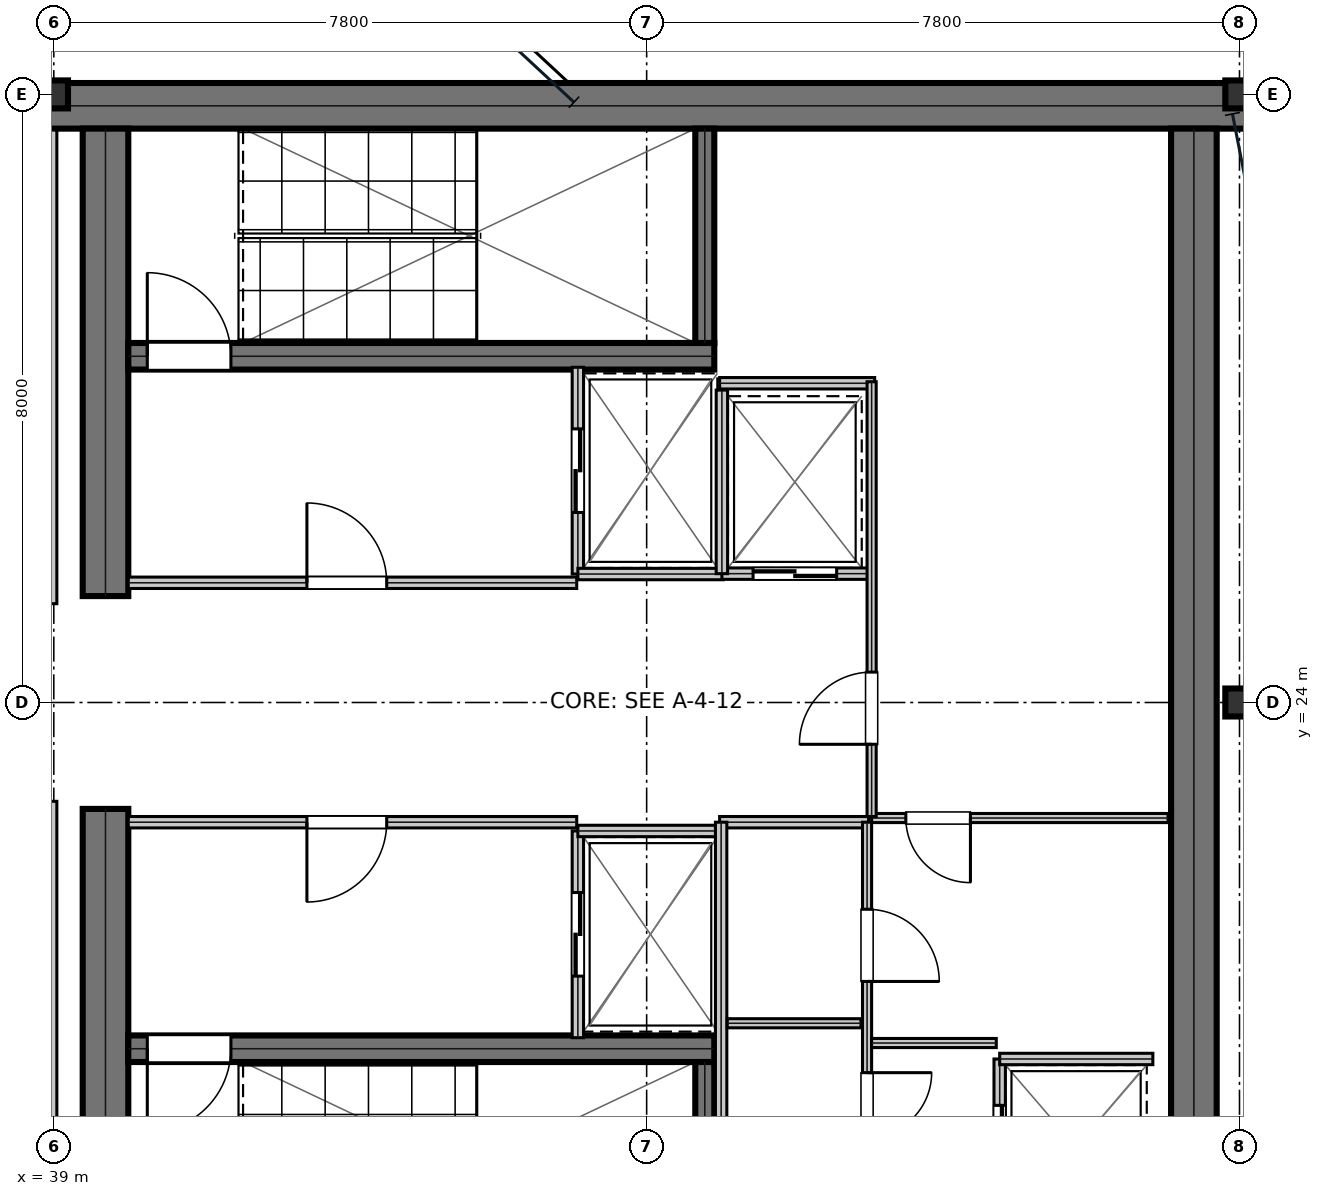
"""IFC4 building model, lengths in metres.
Left out: names, types, materials, properties, quantities, classifications, styles, units other than length and angle.
Written with IfcOpenShell. Run it as: python <this file> out.ifc"""

import sys

from ifc_helpers import new_model, si_unit, direction, frame, frame_2d, origin, origin_2d, place, context, subcontext, project, spatial, rectangle, i_section, extrude, element, fill, save


model = new_model("IFC4")
c1 = context("Model", 3, precision=1e-05, world=origin(), true_north=direction((0.0, 1.0)))
c2 = subcontext(c1, "Body", "Model", "MODEL_VIEW")
j1 = project(units=[si_unit("LENGTHUNIT", "METRE"), si_unit("PLANEANGLEUNIT", "RADIAN")], contexts=[c1])
p1 = place(None, origin())
s1 = spatial("IfcSite", under=j1, at=p1, CompositionType="ELEMENT")
p2 = place(p1, origin())
s2 = spatial("IfcBuilding", under=s1, at=p2, CompositionType="ELEMENT")
p3 = place(p2, frame((0.0, 0.0, 323.55)))
s3 = spatial("IfcBuildingStorey", under=s2, at=p3, CompositionType="ELEMENT", Elevation=323.55)
p4 = place(p3, frame((38.8, 31.85, 0.0), z_axis=(0.0, 0.0, 1.0), x_axis=(1.0, 0.0, 0.0)))
e1 = element("IfcWall", 1, at=p4, inside=s3, PredefinedType="SHEAR", context=c2, shape_type="SweptSolid", body=[
    extrude(rectangle(XDim=16.0, YDim=0.6, at=frame_2d((8.0, 0.0))), origin(), (0.0, 0.0, 1.0), 3.77),
])
for number, where, z_axis, x_axis in (
    (2, (39.68, 16.45, 0.0), (0.0, 0.0, 1.0), (0.0, 1.0, 0.0)),
    (3, (39.68, 25.4, 0.0), (0.0, 0.0, 1.0), (0.0, 1.0, 0.0)),
):
    element("IfcWall", number, at=place(p3, frame(where, z_axis=z_axis, x_axis=x_axis)), inside=s3, PredefinedType="SHEAR", context=c2, shape_type="SweptSolid", body=[
        extrude(rectangle(XDim=6.15, YDim=0.6, at=frame_2d((3.075, 0.0))), origin(), (0.0, 0.0, 1.0), 3.77),
    ])
p5 = place(p3, frame((54.0, 16.45, 0.0), z_axis=(0.0, 0.0, 1.0), x_axis=(0.0, 1.0, 0.0)))
e4 = element("IfcWall", 4, at=p5, inside=s3, PredefinedType="SHEAR", context=c2, shape_type="SweptSolid", body=[
    extrude(rectangle(XDim=15.1, YDim=0.6, at=frame_2d((7.55, 0.0))), origin(), (0.0, 0.0, 1.0), 3.77),
])
p6 = place(p3, frame((39.98, 28.555, 0.0), z_axis=(0.0, 0.0, 1.0), x_axis=(1.0, 0.0, 0.0)))
e5 = element("IfcWall", 5, at=p6, inside=s3, PredefinedType="SHEAR", context=c2, shape_type="SweptSolid", body=[
    extrude(rectangle(XDim=7.71, YDim=0.35, at=frame_2d((3.855, 0.0))), origin(), (0.0, 0.0, 1.0), 3.77),
])
p7 = place(p6, frame((0.25, 0.0, 0.0)))
e6 = element("IfcOpeningElement", 6, at=p7, cuts=e5, PredefinedType="OPENING", context=c2, shape_type="SweptSolid", body=[
    extrude(rectangle(XDim=1.1, YDim=2.15, at=frame_2d((0.55, 1.075))), frame((0.0, 0.185, 0.0), z_axis=(0.0, -1.0, 0.0), x_axis=(1.0, 0.0, 0.0)), (0.0, 0.0, 1.0), 0.37),
])
p8 = place(p3, frame((39.98, 19.445, 0.0), z_axis=(0.0, 0.0, 1.0), x_axis=(1.0, 0.0, 0.0)))
e7 = element("IfcWall", 7, at=p8, inside=s3, PredefinedType="SHEAR", context=c2, shape_type="SweptSolid", body=[
    extrude(rectangle(XDim=7.71, YDim=0.35, at=frame_2d((3.855, 0.0))), origin(), (0.0, 0.0, 1.0), 3.77),
])
p9 = place(p8, frame((0.25, 0.0, 0.0)))
e8 = element("IfcOpeningElement", 8, at=p9, cuts=e7, PredefinedType="OPENING", context=c2, shape_type="SweptSolid", body=[
    extrude(rectangle(XDim=1.1, YDim=2.15, at=frame_2d((0.55, 1.075))), frame((0.0, 0.185, 0.0), z_axis=(0.0, -1.0, 0.0), x_axis=(1.0, 0.0, 0.0)), (0.0, 0.0, 1.0), 0.37),
])
for number, where, z_axis, x_axis in (
    (9, (47.565, 28.73, 0.0), (0.0, 0.0, 1.0), (0.0, 1.0, 0.0)),
    (10, (47.565, 16.45, 0.0), (0.0, 0.0, 1.0), (0.0, 1.0, 0.0)),
):
    element("IfcWall", number, at=place(p3, frame(where, z_axis=z_axis, x_axis=x_axis)), inside=s3, PredefinedType="SHEAR", context=c2, shape_type="SweptSolid", body=[
        extrude(rectangle(XDim=2.82, YDim=0.25, at=frame_2d((1.41, 0.0))), origin(), (0.0, 0.0, 1.0), 3.77),
    ])
for number, where, z_axis, x_axis in (
    (11, (39.0, 32.0, 0.0), (0.0, 0.0, 1.0), (1.0, 0.0, 0.0)),
    (12, (54.6, 24.0, 0.0), (0.0, 0.0, 1.0), (1.0, 0.0, 0.0)),
    (13, (54.6, 32.0, 0.0), (0.0, 0.0, 1.0), (1.0, 0.0, 0.0)),
):
    element("IfcColumn", number, at=place(p3, frame(where, z_axis=z_axis, x_axis=x_axis)), inside=s3, PredefinedType="COLUMN", context=c2, shape_type="SweptSolid", body=[
        extrude(i_section(OverallWidth=0.373, OverallDepth=0.368, WebThickness=0.015, FlangeThickness=0.024, at=origin_2d()), origin(), (0.0, 0.0, 1.0), 4.044),
    ])
p10 = place(p3, frame((39.98, 25.575, 0.0), z_axis=(0.0, 0.0, 1.0), x_axis=(1.0, 0.0, 0.0)))
e14 = element("IfcWall", 14, at=p10, inside=s3, PredefinedType="PARTITIONING", context=c2, shape_type="SweptSolid", body=[
    extrude(rectangle(XDim=5.9, YDim=0.15, at=frame_2d((2.95, 0.0))), origin(), (0.0, 0.0, 1.0), 3.77),
])
p11 = place(p10, frame((2.35, 0.0, 0.0)))
e15 = element("IfcOpeningElement", 15, at=p11, cuts=e14, PredefinedType="OPENING", context=c2, shape_type="SweptSolid", body=[
    extrude(rectangle(XDim=1.05, YDim=2.15, at=frame_2d((0.525, 1.075))), frame((0.0, 0.085, 0.0), z_axis=(0.0, -1.0, 0.0), x_axis=(1.0, 0.0, 0.0)), (0.0, 0.0, 1.0), 0.17),
])
p12 = place(p3, frame((39.98, 22.425, 0.0), z_axis=(0.0, 0.0, 1.0), x_axis=(1.0, 0.0, 0.0)))
e16 = element("IfcWall", 16, at=p12, inside=s3, PredefinedType="PARTITIONING", context=c2, shape_type="SweptSolid", body=[
    extrude(rectangle(XDim=5.9, YDim=0.15, at=frame_2d((2.95, 0.0))), origin(), (0.0, 0.0, 1.0), 3.77),
])
p13 = place(p12, frame((2.35, 0.0, 0.0)))
e17 = element("IfcOpeningElement", 17, at=p13, cuts=e16, PredefinedType="OPENING", context=c2, shape_type="SweptSolid", body=[
    extrude(rectangle(XDim=1.05, YDim=2.15, at=frame_2d((0.525, 1.075))), frame((0.0, 0.085, 0.0), z_axis=(0.0, -1.0, 0.0), x_axis=(1.0, 0.0, 0.0)), (0.0, 0.0, 1.0), 0.17),
])
p14 = place(p3, frame((45.895, 25.69, 0.0), z_axis=(0.0, 0.0, 1.0), x_axis=(0.0, 1.0, 0.0)))
e18 = element("IfcWall", 18, at=p14, inside=s3, PredefinedType="PARTITIONING", context=c2, shape_type="SweptSolid", body=[
    extrude(rectangle(XDim=2.72, YDim=0.15, at=frame_2d((1.36, 0.0))), origin(), (0.0, 0.0, 1.0), 3.77),
])
p15 = place(p14, frame((0.81, 0.0, 0.0)))
e19 = element("IfcOpeningElement", 19, at=p15, cuts=e18, PredefinedType="OPENING", context=c2, shape_type="SweptSolid", body=[
    extrude(rectangle(XDim=1.1, YDim=2.15, at=frame_2d((0.55, 1.075))), frame((0.0, 0.085, 0.0), z_axis=(0.0, -1.0, 0.0), x_axis=(1.0, 0.0, 0.0)), (0.0, 0.0, 1.0), 0.17),
])
p16 = place(p3, frame((45.895, 25.69, 0.0), z_axis=(0.0, 0.0, 1.0), x_axis=(1.0, 0.0, 0.0)))
e20 = element("IfcWall", 20, at=p16, inside=s3, PredefinedType="PARTITIONING", context=c2, shape_type="SweptSolid", body=[
    extrude(rectangle(XDim=1.915, YDim=0.15, at=frame_2d((0.958, 0.0))), origin(), (0.0, 0.0, 1.0), 3.77),
])
p17 = place(p3, frame((45.895, 19.59, 0.0), z_axis=(0.0, 0.0, 1.0), x_axis=(0.0, 1.0, 0.0)))
e21 = element("IfcWall", 21, at=p17, inside=s3, PredefinedType="PARTITIONING", context=c2, shape_type="SweptSolid", body=[
    extrude(rectangle(XDim=2.72, YDim=0.15, at=frame_2d((1.36, 0.0))), origin(), (0.0, 0.0, 1.0), 3.77),
])
p18 = place(p17, frame((0.81, 0.0, 0.0)))
e22 = element("IfcOpeningElement", 22, at=p18, cuts=e21, PredefinedType="OPENING", context=c2, shape_type="SweptSolid", body=[
    extrude(rectangle(XDim=1.1, YDim=2.15, at=frame_2d((0.55, 1.075))), frame((0.0, 0.085, 0.0), z_axis=(0.0, -1.0, 0.0), x_axis=(1.0, 0.0, 0.0)), (0.0, 0.0, 1.0), 0.17),
])
p19 = place(p3, frame((45.895, 22.31, 0.0), z_axis=(0.0, 0.0, 1.0), x_axis=(1.0, 0.0, 0.0)))
e23 = element("IfcWall", 23, at=p19, inside=s3, PredefinedType="PARTITIONING", context=c2, shape_type="SweptSolid", body=[
    extrude(rectangle(XDim=1.915, YDim=0.15, at=frame_2d((0.958, 0.0))), origin(), (0.0, 0.0, 1.0), 3.77),
])
p20 = place(p3, frame((47.79, 25.695, 0.0), z_axis=(0.0, 0.0, 1.0), x_axis=(1.0, 0.0, 0.0)))
e24 = element("IfcWall", 24, at=p20, inside=s3, PredefinedType="PARTITIONING", context=c2, shape_type="SweptSolid", body=[
    extrude(rectangle(XDim=1.92, YDim=0.15, at=frame_2d((0.96, 0.0))), origin(), (0.0, 0.0, 1.0), 3.77),
])
p21 = place(p20, frame((0.41, 0.0, 0.0)))
e25 = element("IfcOpeningElement", 25, at=p21, cuts=e24, PredefinedType="OPENING", context=c2, shape_type="SweptSolid", body=[
    extrude(rectangle(XDim=1.1, YDim=2.15, at=frame_2d((0.55, 1.075))), frame((0.0, 0.085, 0.0), z_axis=(0.0, -1.0, 0.0), x_axis=(1.0, 0.0, 0.0)), (0.0, 0.0, 1.0), 0.17),
])
p22 = place(p3, frame((47.79, 25.695, 0.0), z_axis=(0.0, 0.0, 1.0), x_axis=(0.0, 1.0, 0.0)))
e26 = element("IfcWall", 26, at=p22, inside=s3, PredefinedType="PARTITIONING", context=c2, shape_type="SweptSolid", body=[
    extrude(rectangle(XDim=2.415, YDim=0.15, at=frame_2d((1.208, 0.0))), origin(), (0.0, 0.0, 1.0), 3.77),
])
p23 = place(p3, frame((51.445, 16.99, 0.0), z_axis=(0.0, 0.0, 1.0), x_axis=(0.0, 1.0, 0.0)))
e27 = element("IfcWall", 27, at=p23, inside=s3, PredefinedType="PARTITIONING", context=c2, shape_type="SweptSolid", body=[
    extrude(rectangle(XDim=2.32, YDim=0.15, at=frame_2d((1.16, 0.0))), origin(), (0.0, 0.0, 1.0), 3.77),
])
p24 = place(p23, frame((0.61, 0.0, 0.0)))
e28 = element("IfcOpeningElement", 28, at=p24, cuts=e27, PredefinedType="OPENING", context=c2, shape_type="SweptSolid", body=[
    extrude(rectangle(XDim=1.1, YDim=2.15, at=frame_2d((0.55, 1.075))), frame((0.0, 0.085, 0.0), z_axis=(0.0, -1.0, 0.0), x_axis=(1.0, 0.0, 0.0)), (0.0, 0.0, 1.0), 0.17),
])
p25 = place(p3, frame((51.445, 19.31, 0.0), z_axis=(0.0, 0.0, 1.0), x_axis=(1.0, 0.0, 0.0)))
e29 = element("IfcWall", 29, at=p25, inside=s3, PredefinedType="PARTITIONING", context=c2, shape_type="SweptSolid", body=[
    extrude(rectangle(XDim=2.015, YDim=0.15, at=frame_2d((1.007, 0.0))), origin(), (0.0, 0.0, 1.0), 3.77),
])
p26 = place(p3, frame((47.76, 22.425, 0.0), z_axis=(0.0, 0.0, 1.0), x_axis=(1.0, 0.0, 0.0)))
e30 = element("IfcWall", 30, at=p26, inside=s3, PredefinedType="PARTITIONING", context=c2, shape_type="SweptSolid", body=[
    extrude(rectangle(XDim=1.96, YDim=0.15, at=frame_2d((0.98, 0.0))), origin(), (0.0, 0.0, 1.0), 3.77),
])
p27 = place(p3, frame((47.78, 16.45, 0.0), z_axis=(0.0, 0.0, 1.0), x_axis=(0.0, 1.0, 0.0)))
e31 = element("IfcWall", 31, at=p27, inside=s3, PredefinedType="PARTITIONING", context=c2, shape_type="SweptSolid", body=[
    extrude(rectangle(XDim=5.975, YDim=0.15, at=frame_2d((2.988, 0.0))), origin(), (0.0, 0.0, 1.0), 3.77),
])
p28 = place(p3, frame((47.86, 19.78, 0.0), z_axis=(0.0, 0.0, 1.0), x_axis=(1.0, 0.0, 0.0)))
e32 = element("IfcWall", 32, at=p28, inside=s3, PredefinedType="PARTITIONING", context=c2, shape_type="SweptSolid", body=[
    extrude(rectangle(XDim=1.76, YDim=0.12, at=frame_2d((0.88, 0.0))), origin(), (0.0, 0.0, 1.0), 3.77),
])
p29 = place(p3, frame((49.7, 16.48, 0.0), z_axis=(0.0, 0.0, 1.0), x_axis=(0.0, 1.0, 0.0)))
e33 = element("IfcWall", 33, at=p29, inside=s3, PredefinedType="PARTITIONING", context=c2, shape_type="SweptSolid", body=[
    extrude(rectangle(XDim=5.945, YDim=0.12, at=frame_2d((2.973, 0.0))), origin(), (0.0, 0.0, 1.0), 3.77),
])
p30 = place(p29, frame((1.8, 0.0, 0.0)))
e34 = element("IfcOpeningElement", 34, at=p30, cuts=e33, PredefinedType="OPENING", context=c2, shape_type="SweptSolid", body=[
    extrude(rectangle(XDim=0.85, YDim=2.15, at=frame_2d((0.425, 1.075))), frame((0.0, 0.07, 0.0), z_axis=(0.0, -1.0, 0.0), x_axis=(1.0, 0.0, 0.0)), (0.0, 0.0, 1.0), 0.14),
])
p31 = place(p29, frame((3.85, 0.0, 0.0)))
e35 = element("IfcOpeningElement", 35, at=p31, cuts=e33, PredefinedType="OPENING", context=c2, shape_type="SweptSolid", body=[
    extrude(rectangle(XDim=0.95, YDim=2.15, at=frame_2d((0.475, 1.075))), frame((0.0, 0.07, 0.0), z_axis=(0.0, -1.0, 0.0), x_axis=(1.0, 0.0, 0.0)), (0.0, 0.0, 1.0), 0.14),
])
p32 = place(p3, frame((49.76, 22.48, 0.0), z_axis=(0.0, 0.0, 1.0), x_axis=(1.0, 0.0, 0.0)))
e36 = element("IfcWall", 36, at=p32, inside=s3, PredefinedType="PARTITIONING", context=c2, shape_type="SweptSolid", body=[
    extrude(rectangle(XDim=3.9, YDim=0.12, at=frame_2d((1.95, 0.0))), origin(), (0.0, 0.0, 1.0), 3.77),
])
p33 = place(p32, frame((0.45, 0.0, 0.0)))
e37 = element("IfcOpeningElement", 37, at=p33, cuts=e36, PredefinedType="OPENING", context=c2, shape_type="SweptSolid", body=[
    extrude(rectangle(XDim=0.85, YDim=2.15, at=frame_2d((0.425, 1.075))), frame((0.0, 0.07, 0.0), z_axis=(0.0, -1.0, 0.0), x_axis=(1.0, 0.0, 0.0)), (0.0, 0.0, 1.0), 0.14),
])
p34 = place(p3, frame((49.76, 19.52, 0.0), z_axis=(0.0, 0.0, 1.0), x_axis=(1.0, 0.0, 0.0)))
e38 = element("IfcWall", 38, at=p34, inside=s3, PredefinedType="PARTITIONING", context=c2, shape_type="SweptSolid", body=[
    extrude(rectangle(XDim=1.64, YDim=0.12, at=frame_2d((0.82, 0.0))), origin(), (0.0, 0.0, 1.0), 3.77),
])
p35 = place(p3, frame((47.76, 28.2, 0.0), z_axis=(0.0, 0.0, 1.0), x_axis=(1.0, 0.0, 0.0)))
e39 = element("IfcWall", 39, at=p35, inside=s3, PredefinedType="PARTITIONING", context=c2, shape_type="SweptSolid", body=[
    extrude(rectangle(XDim=2.04, YDim=0.15, at=frame_2d((1.02, 0.0))), origin(), (0.0, 0.0, 1.0), 3.77),
])
p36 = place(p3, frame((49.76, 22.5, 0.0), z_axis=(0.0, 0.0, 1.0), x_axis=(0.0, 1.0, 0.0)))
e40 = element("IfcWall", 40, at=p36, inside=s3, PredefinedType="PARTITIONING", context=c2, shape_type="SweptSolid", body=[
    extrude(rectangle(XDim=5.72, YDim=0.12, at=frame_2d((2.86, 0.0))), origin(), (0.0, 0.0, 1.0), 3.77),
])
p37 = place(p36, frame((0.95, 0.0, 0.0)))
e41 = element("IfcOpeningElement", 41, at=p37, cuts=e40, PredefinedType="OPENING", context=c2, shape_type="SweptSolid", body=[
    extrude(rectangle(XDim=0.95, YDim=2.15, at=frame_2d((0.475, 1.075))), frame((0.0, 0.07, 0.0), z_axis=(0.0, -1.0, 0.0), x_axis=(1.0, 0.0, 0.0)), (0.0, 0.0, 1.0), 0.14),
])
for number, where, z_axis, x_axis in (
    (42, (38.95, 16.469, 0.0), (0.0, 0.0, 1.0), (0.0, 1.0, 0.0)),
    (43, (38.95, 25.3, 0.0), (0.0, 0.0, 1.0), (0.0, 1.0, 0.0)),
):
    element("IfcWall", number, at=place(p3, frame(where, z_axis=z_axis, x_axis=x_axis)), inside=s3, PredefinedType="SOLIDWALL", context=c2, shape_type="SweptSolid", body=[
        extrude(rectangle(XDim=6.231, YDim=0.18, at=frame_2d((3.116, 0.0))), origin(), (0.0, 0.0, 1.0), 3.5),
    ])
p38 = place(p11, origin())
e44 = element("IfcDoor", 44, at=p38, inside=s3, OperationType="SINGLE_SWING_LEFT", PredefinedType="DOOR", context=c2, shape_type="SweptSolid", body=[
    extrude(rectangle(XDim=1.05, YDim=2.15, at=frame_2d((0.525, 1.075))), frame((0.0, 0.025, 0.0), z_axis=(0.0, -1.0, 0.0), x_axis=(1.0, 0.0, 0.0)), (0.0, 0.0, 1.0), 0.05),
])
fill(e15, e44)
p39 = place(p13, frame((1.05, 0.0, 0.0), z_axis=(0.0, 0.0, 1.0), x_axis=(-1.0, 0.0, 0.0)))
e45 = element("IfcDoor", 45, at=p39, inside=s3, OperationType="SINGLE_SWING_RIGHT", PredefinedType="DOOR", context=c2, shape_type="SweptSolid", body=[
    extrude(rectangle(XDim=1.05, YDim=2.15, at=frame_2d((0.525, 1.075))), frame((0.0, 0.025, 0.0), z_axis=(0.0, -1.0, 0.0), x_axis=(1.0, 0.0, 0.0)), (0.0, 0.0, 1.0), 0.05),
])
fill(e17, e45)
p40 = place(p15, frame((1.1, 0.0, 0.0), z_axis=(0.0, 0.0, 1.0), x_axis=(-1.0, 0.0, 0.0)))
e46 = element("IfcDoor", 46, at=p40, inside=s3, OperationType="DOUBLE_DOOR_SLIDING", PredefinedType="DOOR", context=c2, shape_type="SweptSolid", body=[
    extrude(rectangle(XDim=1.1, YDim=2.15, at=frame_2d((0.55, 1.075))), frame((0.0, 0.025, 0.0), z_axis=(0.0, -1.0, 0.0), x_axis=(1.0, 0.0, 0.0)), (0.0, 0.0, 1.0), 0.05),
])
fill(e19, e46)
p41 = place(p18, frame((1.1, 0.0, 0.0), z_axis=(0.0, 0.0, 1.0), x_axis=(-1.0, 0.0, 0.0)))
e47 = element("IfcDoor", 47, at=p41, inside=s3, OperationType="DOUBLE_DOOR_SLIDING", PredefinedType="DOOR", context=c2, shape_type="SweptSolid", body=[
    extrude(rectangle(XDim=1.1, YDim=2.15, at=frame_2d((0.55, 1.075))), frame((0.0, 0.025, 0.0), z_axis=(0.0, -1.0, 0.0), x_axis=(1.0, 0.0, 0.0)), (0.0, 0.0, 1.0), 0.05),
])
fill(e22, e47)
p42 = place(p21, frame((1.1, 0.0, 0.0), z_axis=(0.0, 0.0, 1.0), x_axis=(-1.0, 0.0, 0.0)))
e48 = element("IfcDoor", 48, at=p42, inside=s3, OperationType="DOUBLE_DOOR_SLIDING", PredefinedType="DOOR", context=c2, shape_type="SweptSolid", body=[
    extrude(rectangle(XDim=1.1, YDim=2.15, at=frame_2d((0.55, 1.075))), frame((0.0, 0.025, 0.0), z_axis=(0.0, -1.0, 0.0), x_axis=(1.0, 0.0, 0.0)), (0.0, 0.0, 1.0), 0.05),
])
fill(e25, e48)
p43 = place(p24, frame((1.1, 0.0, 0.0), z_axis=(0.0, 0.0, 1.0), x_axis=(-1.0, 0.0, 0.0)))
e49 = element("IfcDoor", 49, at=p43, inside=s3, OperationType="DOUBLE_DOOR_SLIDING", PredefinedType="DOOR", context=c2, shape_type="SweptSolid", body=[
    extrude(rectangle(XDim=1.1, YDim=2.15, at=frame_2d((0.55, 1.075))), frame((0.0, 0.025, 0.0), z_axis=(0.0, -1.0, 0.0), x_axis=(1.0, 0.0, 0.0)), (0.0, 0.0, 1.0), 0.05),
])
fill(e28, e49)
p44 = place(p30, frame((0.85, 0.0, 0.0), z_axis=(0.0, 0.0, 1.0), x_axis=(-1.0, 0.0, 0.0)))
e50 = element("IfcDoor", 50, at=p44, inside=s3, OperationType="SINGLE_SWING_LEFT", PredefinedType="DOOR", context=c2, shape_type="SweptSolid", body=[
    extrude(rectangle(XDim=0.85, YDim=2.15, at=frame_2d((0.425, 1.075))), frame((0.0, 0.025, 0.0), z_axis=(0.0, -1.0, 0.0), x_axis=(1.0, 0.0, 0.0)), (0.0, 0.0, 1.0), 0.05),
])
fill(e34, e50)
p45 = place(p31, frame((0.95, 0.0, 0.0), z_axis=(0.0, 0.0, 1.0), x_axis=(-1.0, 0.0, 0.0)))
e51 = element("IfcDoor", 51, at=p45, inside=s3, OperationType="SINGLE_SWING_RIGHT", PredefinedType="DOOR", context=c2, shape_type="SweptSolid", body=[
    extrude(rectangle(XDim=0.95, YDim=2.15, at=frame_2d((0.475, 1.075))), frame((0.0, 0.025, 0.0), z_axis=(0.0, -1.0, 0.0), x_axis=(1.0, 0.0, 0.0)), (0.0, 0.0, 1.0), 0.05),
])
fill(e35, e51)
p46 = place(p33, frame((0.85, 0.0, 0.0), z_axis=(0.0, 0.0, 1.0), x_axis=(-1.0, 0.0, 0.0)))
e52 = element("IfcDoor", 52, at=p46, inside=s3, OperationType="SINGLE_SWING_LEFT", PredefinedType="DOOR", context=c2, shape_type="SweptSolid", body=[
    extrude(rectangle(XDim=0.85, YDim=2.15, at=frame_2d((0.425, 1.075))), frame((0.0, 0.025, 0.0), z_axis=(0.0, -1.0, 0.0), x_axis=(1.0, 0.0, 0.0)), (0.0, 0.0, 1.0), 0.05),
])
fill(e37, e52)
p47 = place(p37, origin())
e53 = element("IfcDoor", 53, at=p47, inside=s3, OperationType="SINGLE_SWING_LEFT", PredefinedType="DOOR", context=c2, shape_type="SweptSolid", body=[
    extrude(rectangle(XDim=0.95, YDim=2.15, at=frame_2d((0.475, 1.075))), frame((0.0, 0.025, 0.0), z_axis=(0.0, -1.0, 0.0), x_axis=(1.0, 0.0, 0.0)), (0.0, 0.0, 1.0), 0.05),
])
fill(e41, e53)
p48 = place(p7, origin())
e54 = element("IfcDoor", 54, at=p48, inside=s3, OperationType="SINGLE_SWING_LEFT", PredefinedType="DOOR", context=c2, shape_type="SweptSolid", body=[
    extrude(rectangle(XDim=1.1, YDim=2.15, at=frame_2d((0.55, 1.075))), frame((0.0, 0.025, 0.0), z_axis=(0.0, -1.0, 0.0), x_axis=(1.0, 0.0, 0.0)), (0.0, 0.0, 1.0), 0.05),
])
fill(e6, e54)
p49 = place(p9, frame((1.1, 0.0, 0.0), z_axis=(0.0, 0.0, 1.0), x_axis=(-1.0, 0.0, 0.0)))
e55 = element("IfcDoor", 55, at=p49, inside=s3, OperationType="SINGLE_SWING_RIGHT", PredefinedType="DOOR", context=c2, shape_type="SweptSolid", body=[
    extrude(rectangle(XDim=1.1, YDim=2.15, at=frame_2d((0.55, 1.075))), frame((0.0, 0.025, 0.0), z_axis=(0.0, -1.0, 0.0), x_axis=(1.0, 0.0, 0.0)), (0.0, 0.0, 1.0), 0.05),
])
fill(e8, e55)
save(model, sys.argv[1])
